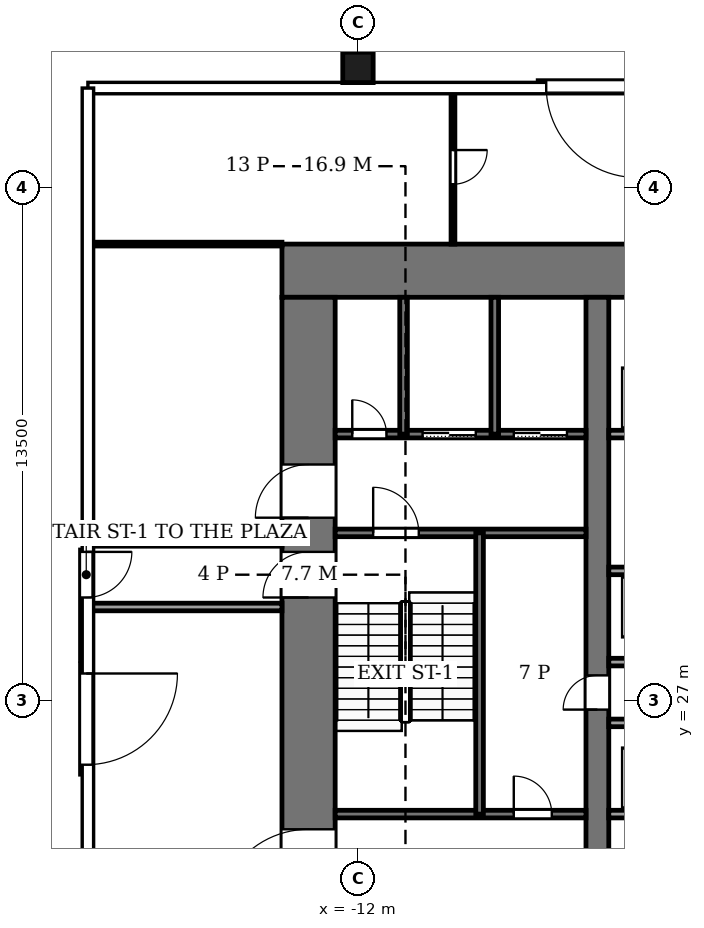
"""IFC4 building model, lengths in metres.
Left out: names, types, materials, properties, quantities, classifications, styles, units other than length and angle.
Written with IfcOpenShell. Run it as: python <this file> out.ifc"""

import sys

from ifc_helpers import new_model, si_unit, direction, frame, frame_2d, origin, origin_2d, place, context, subcontext, project, spatial, rectangle, hollow_rectangle, extrude, element, fill, save


model = new_model("IFC4")
c1 = context("Model", 3, precision=1e-05, world=origin(), true_north=direction((0.0, 1.0)))
c2 = subcontext(c1, "Body", "Model", "MODEL_VIEW")
j1 = project(units=[si_unit("LENGTHUNIT", "METRE"), si_unit("PLANEANGLEUNIT", "RADIAN")], contexts=[c1])
p1 = place(None, origin())
s1 = spatial("IfcSite", under=j1, at=p1, CompositionType="ELEMENT")
p2 = place(p1, origin())
s2 = spatial("IfcBuilding", under=s1, at=p2, CompositionType="ELEMENT")
p3 = place(p2, origin())
s3 = spatial("IfcBuildingStorey", under=s2, at=p3, CompositionType="ELEMENT", Elevation=0.0)
p4 = place(p3, frame((-14.0, 38.3, -0.45), z_axis=(0.0, 0.0, 1.0), x_axis=(1.0, 0.0, 0.0)))
e1 = element("IfcWall", 1, at=p4, inside=s3, PredefinedType="SHEAR", context=c2, shape_type="SweptSolid", body=[
    extrude(rectangle(XDim=28.0, YDim=1.4, at=frame_2d((14.0, 0.0))), origin(), (0.0, 0.0, 1.0), 9.32),
])
p5 = place(p3, frame((-13.3, 18.4, -0.45), z_axis=(0.0, 0.0, 1.0), x_axis=(0.0, 1.0, 0.0)))
e2 = element("IfcWall", 2, at=p5, inside=s3, PredefinedType="SHEAR", context=c2, shape_type="SweptSolid", body=[
    extrude(rectangle(XDim=19.2, YDim=1.4, at=frame_2d((9.6, 0.0))), origin(), (0.0, 0.0, 1.0), 9.32),
])
p6 = place(p5, frame((2.8, 0.0, 0.45)))
e3 = element("IfcOpeningElement", 3, at=p6, cuts=e2, PredefinedType="OPENING", context=c2, shape_type="SweptSolid", body=[
    extrude(rectangle(XDim=2.4, YDim=2.4, at=frame_2d((1.2, 1.2))), frame((0.0, 0.71, 0.0), z_axis=(0.0, -1.0, 0.0), x_axis=(1.0, 0.0, 0.0)), (0.0, 0.0, 1.0), 1.42),
])
p7 = place(p5, frame((13.4, 0.0, 0.45)))
e4 = element("IfcOpeningElement", 4, at=p7, cuts=e2, PredefinedType="OPENING", context=c2, shape_type="SweptSolid", body=[
    extrude(rectangle(XDim=1.4, YDim=2.2, at=frame_2d((0.7, 1.1))), frame((0.0, 0.71, 0.0), z_axis=(0.0, -1.0, 0.0), x_axis=(1.0, 0.0, 0.0)), (0.0, 0.0, 1.0), 1.42),
])
p8 = place(p5, frame((11.3, 0.0, 0.45)))
e5 = element("IfcOpeningElement", 5, at=p8, cuts=e2, PredefinedType="OPENING", context=c2, shape_type="SweptSolid", body=[
    extrude(rectangle(XDim=1.2, YDim=2.2, at=frame_2d((0.6, 1.1))), frame((0.0, 0.71, 0.0), z_axis=(0.0, -1.0, 0.0), x_axis=(1.0, 0.0, 0.0)), (0.0, 0.0, 1.0), 1.42),
])
p9 = place(p3, frame((-5.7, 18.4, -0.45), z_axis=(0.0, 0.0, 1.0), x_axis=(0.0, 1.0, 0.0)))
e6 = element("IfcWall", 6, at=p9, inside=s3, PredefinedType="SHEAR", context=c2, shape_type="SweptSolid", body=[
    extrude(rectangle(XDim=19.2, YDim=0.6, at=frame_2d((9.6, 0.0))), origin(), (0.0, 0.0, 1.0), 9.32),
])
p10 = place(p9, frame((8.35, 0.0, 0.45)))
e7 = element("IfcOpeningElement", 7, at=p10, cuts=e6, PredefinedType="OPENING", context=c2, shape_type="SweptSolid", body=[
    extrude(rectangle(XDim=0.9, YDim=2.1, at=frame_2d((0.45, 1.05))), frame((0.0, 0.31, 0.0), z_axis=(0.0, -1.0, 0.0), x_axis=(1.0, 0.0, 0.0)), (0.0, 0.0, 1.0), 0.62),
])
p11 = place(p3, frame((-12.0, 43.65, 0.0), z_axis=(0.0, 0.0, 1.0), x_axis=(1.0, 0.0, 0.0)))
e8 = element("IfcColumn", 8, at=p11, inside=s3, PredefinedType="COLUMN", context=c2, shape_type="SweptSolid", body=[
    extrude(hollow_rectangle(XDim=0.8, YDim=0.8, WallThickness=0.04, at=origin_2d()), origin(), (0.0, 0.0, 1.0), 9.0),
])
p12 = place(p3, frame((-4.435, 43.15, 0.0), z_axis=(0.0, 0.0, 1.0), x_axis=(-1.0, 0.0, 0.0)))
e9 = element("IfcWall", 9, at=p12, inside=s3, PredefinedType="SOLIDWALL", context=c2, shape_type="SweptSolid", body=[
    extrude(rectangle(XDim=2.823, YDim=0.3, at=frame_2d((1.412, 0.0))), origin(), (0.0, 0.0, 1.0), 3.11),
])
p13 = place(p12, frame((0.211, 0.0, 0.0)))
e10 = element("IfcOpeningElement", 10, at=p13, cuts=e9, PredefinedType="OPENING", context=c2, shape_type="SweptSolid", body=[
    extrude(rectangle(XDim=2.4, YDim=2.7, at=frame_2d((1.2, 1.35))), frame((0.0, 0.16, 0.0), z_axis=(0.0, -1.0, 0.0), x_axis=(1.0, 0.0, 0.0)), (0.0, 0.0, 1.0), 0.32),
])
p14 = place(p3, frame((-19.15, 27.95, 0.0), z_axis=(0.0, 0.0, 1.0), x_axis=(0.0, -1.0, 0.0)))
e11 = element("IfcWall", 11, at=p14, inside=s3, PredefinedType="SOLIDWALL", context=c2, shape_type="SweptSolid", body=[
    extrude(rectangle(XDim=2.9, YDim=0.3, at=frame_2d((1.45, 0.0))), origin(), (0.0, 0.0, 1.0), 3.11),
])
p15 = place(p14, frame((0.25, 0.0, 0.0)))
e12 = element("IfcOpeningElement", 12, at=p15, cuts=e11, PredefinedType="OPENING", context=c2, shape_type="SweptSolid", body=[
    extrude(rectangle(XDim=2.4, YDim=2.7, at=frame_2d((1.2, 1.35))), frame((0.0, 0.16, 0.0), z_axis=(0.0, -1.0, 0.0), x_axis=(1.0, 0.0, 0.0)), (0.0, 0.0, 1.0), 0.32),
])
p16 = place(p3, frame((-19.15, 30.95, 0.0), z_axis=(0.0, 0.0, 1.0), x_axis=(0.0, -1.0, 0.0)))
e13 = element("IfcWall", 13, at=p16, inside=s3, PredefinedType="SOLIDWALL", context=c2, shape_type="SweptSolid", body=[
    extrude(rectangle(XDim=2.9, YDim=0.3, at=frame_2d((1.45, 0.0))), origin(), (0.0, 0.0, 1.0), 3.11),
])
p17 = place(p16, frame((0.05, 0.0, 0.0)))
e14 = element("IfcOpeningElement", 14, at=p17, cuts=e13, PredefinedType="OPENING", context=c2, shape_type="SweptSolid", body=[
    extrude(rectangle(XDim=1.2, YDim=2.2, at=frame_2d((0.6, 1.1))), frame((0.0, 0.16, 0.0), z_axis=(0.0, -1.0, 0.0), x_axis=(1.0, 0.0, 0.0)), (0.0, 0.0, 1.0), 0.32),
])
p18 = place(p3, frame((-12.6, 24.0, 0.0), z_axis=(0.0, 0.0, 1.0), x_axis=(1.0, 0.0, 0.0)))
e15 = element("IfcWall", 15, at=p18, inside=s3, PredefinedType="PARTITIONING", context=c2, shape_type="SweptSolid", body=[
    extrude(rectangle(XDim=6.6, YDim=0.2, at=frame_2d((3.3, 0.0))), origin(), (0.0, 0.0, 1.0), 8.87),
])
p19 = place(p18, frame((4.7, 0.0, 0.0)))
e16 = element("IfcOpeningElement", 16, at=p19, cuts=e15, PredefinedType="OPENING", context=c2, shape_type="SweptSolid", body=[
    extrude(rectangle(XDim=1.0, YDim=2.1, at=frame_2d((0.5, 1.05))), frame((0.0, 0.11, 0.0), z_axis=(0.0, -1.0, 0.0), x_axis=(1.0, 0.0, 0.0)), (0.0, 0.0, 1.0), 0.22),
])
p20 = place(p3, frame((-5.4, 24.0, 0.0), z_axis=(0.0, 0.0, 1.0), x_axis=(1.0, 0.0, 0.0)))
e17 = element("IfcWall", 17, at=p20, inside=s3, PredefinedType="PARTITIONING", context=c2, shape_type="SweptSolid", body=[
    extrude(rectangle(XDim=10.8, YDim=0.2, at=frame_2d((5.4, 0.0))), origin(), (0.0, 0.0, 1.0), 8.87),
])
p21 = place(p20, frame((0.75, 0.0, 0.0)))
e18 = element("IfcOpeningElement", 18, at=p21, cuts=e17, PredefinedType="OPENING", context=c2, shape_type="SweptSolid", body=[
    extrude(rectangle(XDim=1.2, YDim=2.2, at=frame_2d((0.6, 1.1))), frame((0.0, 0.11, 0.0), z_axis=(0.0, -1.0, 0.0), x_axis=(1.0, 0.0, 0.0)), (0.0, 0.0, 1.0), 0.22),
])
p22 = place(p20, frame((3.45, 0.0, 0.0)))
e19 = element("IfcOpeningElement", 19, at=p22, cuts=e17, PredefinedType="OPENING", context=c2, shape_type="SweptSolid", body=[
    extrude(rectangle(XDim=1.2, YDim=2.2, at=frame_2d((0.6, 1.1))), frame((0.0, 0.11, 0.0), z_axis=(0.0, -1.0, 0.0), x_axis=(1.0, 0.0, 0.0)), (0.0, 0.0, 1.0), 0.22),
])
p23 = place(p20, frame((6.15, 0.0, 0.0)))
e20 = element("IfcOpeningElement", 20, at=p23, cuts=e17, PredefinedType="OPENING", context=c2, shape_type="SweptSolid", body=[
    extrude(rectangle(XDim=1.2, YDim=2.2, at=frame_2d((0.6, 1.1))), frame((0.0, 0.11, 0.0), z_axis=(0.0, -1.0, 0.0), x_axis=(1.0, 0.0, 0.0)), (0.0, 0.0, 1.0), 0.22),
])
p24 = place(p20, frame((8.85, 0.0, 0.0)))
e21 = element("IfcOpeningElement", 21, at=p24, cuts=e17, PredefinedType="OPENING", context=c2, shape_type="SweptSolid", body=[
    extrude(rectangle(XDim=1.2, YDim=2.2, at=frame_2d((0.6, 1.1))), frame((0.0, 0.11, 0.0), z_axis=(0.0, -1.0, 0.0), x_axis=(1.0, 0.0, 0.0)), (0.0, 0.0, 1.0), 0.22),
])
for number, where, z_axis, x_axis in (
    (22, (-5.4, 26.4, 0.0), (0.0, 0.0, 1.0), (1.0, 0.0, 0.0)),
    (23, (-5.4, 28.0, 0.0), (0.0, 0.0, 1.0), (1.0, 0.0, 0.0)),
):
    element("IfcWall", number, at=place(p3, frame(where, z_axis=z_axis, x_axis=x_axis)), inside=s3, PredefinedType="PARTITIONING", context=c2, shape_type="SweptSolid", body=[
        extrude(rectangle(XDim=10.8, YDim=0.2, at=frame_2d((5.4, 0.0))), origin(), (0.0, 0.0, 1.0), 8.87),
    ])
p25 = place(p3, frame((-5.4, 30.4, 0.0), z_axis=(0.0, 0.0, 1.0), x_axis=(1.0, 0.0, 0.0)))
e24 = element("IfcWall", 24, at=p25, inside=s3, PredefinedType="PARTITIONING", context=c2, shape_type="SweptSolid", body=[
    extrude(rectangle(XDim=10.8, YDim=0.2, at=frame_2d((5.4, 0.0))), origin(), (0.0, 0.0, 1.0), 8.87),
])
p26 = place(p25, frame((0.75, 0.0, 0.0)))
e25 = element("IfcOpeningElement", 25, at=p26, cuts=e24, PredefinedType="OPENING", context=c2, shape_type="SweptSolid", body=[
    extrude(rectangle(XDim=1.2, YDim=2.2, at=frame_2d((0.6, 1.1))), frame((0.0, 0.11, 0.0), z_axis=(0.0, -1.0, 0.0), x_axis=(1.0, 0.0, 0.0)), (0.0, 0.0, 1.0), 0.22),
])
p27 = place(p25, frame((3.45, 0.0, 0.0)))
e26 = element("IfcOpeningElement", 26, at=p27, cuts=e24, PredefinedType="OPENING", context=c2, shape_type="SweptSolid", body=[
    extrude(rectangle(XDim=1.2, YDim=2.2, at=frame_2d((0.6, 1.1))), frame((0.0, 0.11, 0.0), z_axis=(0.0, -1.0, 0.0), x_axis=(1.0, 0.0, 0.0)), (0.0, 0.0, 1.0), 0.22),
])
p28 = place(p25, frame((6.15, 0.0, 0.0)))
e27 = element("IfcOpeningElement", 27, at=p28, cuts=e24, PredefinedType="OPENING", context=c2, shape_type="SweptSolid", body=[
    extrude(rectangle(XDim=1.2, YDim=2.2, at=frame_2d((0.6, 1.1))), frame((0.0, 0.11, 0.0), z_axis=(0.0, -1.0, 0.0), x_axis=(1.0, 0.0, 0.0)), (0.0, 0.0, 1.0), 0.22),
])
p29 = place(p25, frame((8.85, 0.0, 0.0)))
e28 = element("IfcOpeningElement", 28, at=p29, cuts=e24, PredefinedType="OPENING", context=c2, shape_type="SweptSolid", body=[
    extrude(rectangle(XDim=1.2, YDim=2.2, at=frame_2d((0.6, 1.1))), frame((0.0, 0.11, 0.0), z_axis=(0.0, -1.0, 0.0), x_axis=(1.0, 0.0, 0.0)), (0.0, 0.0, 1.0), 0.22),
])
p30 = place(p3, frame((-12.6, 31.4, 0.0), z_axis=(0.0, 0.0, 1.0), x_axis=(1.0, 0.0, 0.0)))
e29 = element("IfcWall", 29, at=p30, inside=s3, PredefinedType="PARTITIONING", context=c2, shape_type="SweptSolid", body=[
    extrude(rectangle(XDim=6.6, YDim=0.2, at=frame_2d((3.3, 0.0))), origin(), (0.0, 0.0, 1.0), 8.87),
])
p31 = place(p30, frame((1.0, 0.0, 0.0)))
e30 = element("IfcOpeningElement", 30, at=p31, cuts=e29, PredefinedType="OPENING", context=c2, shape_type="SweptSolid", body=[
    extrude(rectangle(XDim=1.2, YDim=2.2, at=frame_2d((0.6, 1.1))), frame((0.0, 0.11, 0.0), z_axis=(0.0, -1.0, 0.0), x_axis=(1.0, 0.0, 0.0)), (0.0, 0.0, 1.0), 0.22),
])
p32 = place(p3, frame((-12.6, 34.0, 0.0), z_axis=(0.0, 0.0, 1.0), x_axis=(1.0, 0.0, 0.0)))
e31 = element("IfcWall", 31, at=p32, inside=s3, PredefinedType="PARTITIONING", context=c2, shape_type="SweptSolid", body=[
    extrude(rectangle(XDim=6.6, YDim=0.2, at=frame_2d((3.3, 0.0))), origin(), (0.0, 0.0, 1.0), 8.87),
])
p33 = place(p32, frame((4.7, 0.0, 0.0)))
e32 = element("IfcOpeningElement", 32, at=p33, cuts=e31, PredefinedType="OPENING", context=c2, shape_type="SweptSolid", body=[
    extrude(rectangle(XDim=1.4, YDim=2.2, at=frame_2d((0.7, 1.1))), frame((0.0, 0.11, 0.0), z_axis=(0.0, -1.0, 0.0), x_axis=(1.0, 0.0, 0.0)), (0.0, 0.0, 1.0), 0.22),
])
p34 = place(p32, frame((2.3, 0.0, 0.0)))
e33 = element("IfcOpeningElement", 33, at=p34, cuts=e31, PredefinedType="OPENING", context=c2, shape_type="SweptSolid", body=[
    extrude(rectangle(XDim=1.4, YDim=2.2, at=frame_2d((0.7, 1.1))), frame((0.0, 0.11, 0.0), z_axis=(0.0, -1.0, 0.0), x_axis=(1.0, 0.0, 0.0)), (0.0, 0.0, 1.0), 0.22),
])
p35 = place(p32, frame((0.45, 0.0, 0.0)))
e34 = element("IfcOpeningElement", 34, at=p35, cuts=e31, PredefinedType="OPENING", context=c2, shape_type="SweptSolid", body=[
    extrude(rectangle(XDim=0.9, YDim=2.1, at=frame_2d((0.45, 1.05))), frame((0.0, 0.11, 0.0), z_axis=(0.0, -1.0, 0.0), x_axis=(1.0, 0.0, 0.0)), (0.0, 0.0, 1.0), 0.22),
])
p36 = place(p3, frame((-5.4, 34.0, 0.0), z_axis=(0.0, 0.0, 1.0), x_axis=(1.0, 0.0, 0.0)))
e35 = element("IfcWall", 35, at=p36, inside=s3, PredefinedType="PARTITIONING", context=c2, shape_type="SweptSolid", body=[
    extrude(rectangle(XDim=10.8, YDim=0.2, at=frame_2d((5.4, 0.0))), origin(), (0.0, 0.0, 1.0), 8.87),
])
p37 = place(p36, frame((0.75, 0.0, 0.0)))
e36 = element("IfcOpeningElement", 36, at=p37, cuts=e35, PredefinedType="OPENING", context=c2, shape_type="SweptSolid", body=[
    extrude(rectangle(XDim=1.2, YDim=2.2, at=frame_2d((0.6, 1.1))), frame((0.0, 0.11, 0.0), z_axis=(0.0, -1.0, 0.0), x_axis=(1.0, 0.0, 0.0)), (0.0, 0.0, 1.0), 0.22),
])
p38 = place(p36, frame((3.45, 0.0, 0.0)))
e37 = element("IfcOpeningElement", 37, at=p38, cuts=e35, PredefinedType="OPENING", context=c2, shape_type="SweptSolid", body=[
    extrude(rectangle(XDim=1.2, YDim=2.2, at=frame_2d((0.6, 1.1))), frame((0.0, 0.11, 0.0), z_axis=(0.0, -1.0, 0.0), x_axis=(1.0, 0.0, 0.0)), (0.0, 0.0, 1.0), 0.22),
])
p39 = place(p36, frame((6.15, 0.0, 0.0)))
e38 = element("IfcOpeningElement", 38, at=p39, cuts=e35, PredefinedType="OPENING", context=c2, shape_type="SweptSolid", body=[
    extrude(rectangle(XDim=1.2, YDim=2.2, at=frame_2d((0.6, 1.1))), frame((0.0, 0.11, 0.0), z_axis=(0.0, -1.0, 0.0), x_axis=(1.0, 0.0, 0.0)), (0.0, 0.0, 1.0), 0.22),
])
p40 = place(p36, frame((8.95, 0.0, 0.0)))
e39 = element("IfcOpeningElement", 39, at=p40, cuts=e35, PredefinedType="OPENING", context=c2, shape_type="SweptSolid", body=[
    extrude(rectangle(XDim=1.0, YDim=2.1, at=frame_2d((0.5, 1.05))), frame((0.0, 0.11, 0.0), z_axis=(0.0, -1.0, 0.0), x_axis=(1.0, 0.0, 0.0)), (0.0, 0.0, 1.0), 0.22),
])
p41 = place(p3, frame((-10.8, 34.0, 0.0), z_axis=(0.0, 0.0, 1.0), x_axis=(0.0, 1.0, 0.0)))
e40 = element("IfcWall", 40, at=p41, inside=s3, PredefinedType="PARTITIONING", context=c2, shape_type="SweptSolid", body=[
    extrude(rectangle(XDim=3.6, YDim=0.2, at=frame_2d((1.8, 0.0))), origin(), (0.0, 0.0, 1.0), 8.87),
])
p42 = place(p3, frame((-8.8, 24.0, 0.0), z_axis=(0.0, 0.0, 1.0), x_axis=(0.0, 1.0, 0.0)))
e41 = element("IfcWall", 41, at=p42, inside=s3, PredefinedType="PARTITIONING", context=c2, shape_type="SweptSolid", body=[
    extrude(rectangle(XDim=7.4, YDim=0.2, at=frame_2d((3.7, 0.0))), origin(), (0.0, 0.0, 1.0), 8.87),
])
p43 = place(p3, frame((-8.4, 34.0, 0.0), z_axis=(0.0, 0.0, 1.0), x_axis=(0.0, 1.0, 0.0)))
e42 = element("IfcWall", 42, at=p43, inside=s3, PredefinedType="PARTITIONING", context=c2, shape_type="SweptSolid", body=[
    extrude(rectangle(XDim=3.6, YDim=0.2, at=frame_2d((1.8, 0.0))), origin(), (0.0, 0.0, 1.0), 8.87),
])
for number, where, z_axis, x_axis in (
    (43, (-14.0, 29.45, 0.0), (0.0, 0.0, 1.0), (-1.0, 0.0, 0.0)),
    (44, (-14.0, 31.15, 0.0), (0.0, 0.0, 1.0), (-1.0, 0.0, 0.0)),
):
    element("IfcWall", number, at=place(p3, frame(where, z_axis=z_axis, x_axis=x_axis)), inside=s3, PredefinedType="PARTITIONING", context=c2, shape_type="SweptSolid", body=[
        extrude(rectangle(XDim=5.0, YDim=0.2, at=frame_2d((2.5, 0.0))), origin(), (0.0, 0.0, 1.0), 8.75),
    ])
p44 = place(p3, frame((-14.0, 39.0, 0.0), z_axis=(0.0, 0.0, 1.0), x_axis=(-1.0, 0.0, 0.0)))
e45 = element("IfcWall", 45, at=p44, inside=s3, PredefinedType="PARTITIONING", context=c2, shape_type="SweptSolid", body=[
    extrude(rectangle(XDim=5.05, YDim=0.1, at=frame_2d((2.525, 0.0))), origin(), (0.0, 0.0, 1.0), 8.14),
])
p45 = place(p3, frame((-9.5, 43.05, 0.0), z_axis=(0.0, 0.0, 1.0), x_axis=(0.0, -1.0, 0.0)))
e46 = element("IfcWall", 46, at=p45, inside=s3, PredefinedType="PARTITIONING", context=c2, shape_type="SweptSolid", body=[
    extrude(rectangle(XDim=4.05, YDim=0.1, at=frame_2d((2.025, 0.0))), origin(), (0.0, 0.0, 1.0), 8.87),
])
p46 = place(p45, frame((1.575, 0.0, 0.0)))
e47 = element("IfcOpeningElement", 47, at=p46, cuts=e46, PredefinedType="OPENING", context=c2, shape_type="SweptSolid", body=[
    extrude(rectangle(XDim=0.9, YDim=2.1, at=frame_2d((0.45, 1.05))), frame((0.0, 0.06, 0.0), z_axis=(0.0, -1.0, 0.0), x_axis=(1.0, 0.0, 0.0)), (0.0, 0.0, 1.0), 0.12),
])
p47 = place(p13, origin())
e48 = element("IfcDoor", 48, at=p47, inside=s3, OperationType="DOUBLE_DOOR_SINGLE_SWING", PredefinedType="DOOR", context=c2, shape_type="SweptSolid", body=[
    extrude(rectangle(XDim=2.4, YDim=2.7, at=frame_2d((1.2, 1.35))), frame((0.0, 0.025, 0.0), z_axis=(0.0, -1.0, 0.0), x_axis=(1.0, 0.0, 0.0)), (0.0, 0.0, 1.0), 0.05),
])
fill(e10, e48)
p48 = place(p15, origin())
e49 = element("IfcDoor", 49, at=p48, inside=s3, OperationType="DOUBLE_DOOR_SINGLE_SWING", PredefinedType="DOOR", context=c2, shape_type="SweptSolid", body=[
    extrude(rectangle(XDim=2.4, YDim=2.7, at=frame_2d((1.2, 1.35))), frame((0.0, 0.025, 0.0), z_axis=(0.0, -1.0, 0.0), x_axis=(1.0, 0.0, 0.0)), (0.0, 0.0, 1.0), 0.05),
])
fill(e12, e49)
p49 = place(p17, origin())
e50 = element("IfcDoor", 50, at=p49, inside=s3, OperationType="SINGLE_SWING_LEFT", PredefinedType="DOOR", context=c2, shape_type="SweptSolid", body=[
    extrude(rectangle(XDim=1.2, YDim=2.2, at=frame_2d((0.6, 1.1))), frame((0.0, 0.025, 0.0), z_axis=(0.0, -1.0, 0.0), x_axis=(1.0, 0.0, 0.0)), (0.0, 0.0, 1.0), 0.05),
])
fill(e14, e50)
p50 = place(p33, origin())
e51 = element("IfcDoor", 51, at=p50, inside=s3, OperationType="SLIDING_TO_LEFT", PredefinedType="DOOR", context=c2, shape_type="SweptSolid", body=[
    extrude(rectangle(XDim=1.4, YDim=2.2, at=frame_2d((0.7, 1.1))), frame((0.0, 0.025, 0.0), z_axis=(0.0, -1.0, 0.0), x_axis=(1.0, 0.0, 0.0)), (0.0, 0.0, 1.0), 0.05),
])
fill(e32, e51)
p51 = place(p34, origin())
e52 = element("IfcDoor", 52, at=p51, inside=s3, OperationType="SLIDING_TO_LEFT", PredefinedType="DOOR", context=c2, shape_type="SweptSolid", body=[
    extrude(rectangle(XDim=1.4, YDim=2.2, at=frame_2d((0.7, 1.1))), frame((0.0, 0.025, 0.0), z_axis=(0.0, -1.0, 0.0), x_axis=(1.0, 0.0, 0.0)), (0.0, 0.0, 1.0), 0.05),
])
fill(e33, e52)
p52 = place(p35, origin())
e53 = element("IfcDoor", 53, at=p52, inside=s3, OperationType="SINGLE_SWING_RIGHT", PredefinedType="DOOR", context=c2, shape_type="SweptSolid", body=[
    extrude(rectangle(XDim=0.9, YDim=2.1, at=frame_2d((0.45, 1.05))), frame((0.0, 0.025, 0.0), z_axis=(0.0, -1.0, 0.0), x_axis=(1.0, 0.0, 0.0)), (0.0, 0.0, 1.0), 0.05),
])
fill(e34, e53)
p53 = place(p19, origin())
e54 = element("IfcDoor", 54, at=p53, inside=s3, OperationType="SINGLE_SWING_RIGHT", PredefinedType="DOOR", context=c2, shape_type="SweptSolid", body=[
    extrude(rectangle(XDim=1.0, YDim=2.1, at=frame_2d((0.5, 1.05))), frame((0.0, 0.025, 0.0), z_axis=(0.0, -1.0, 0.0), x_axis=(1.0, 0.0, 0.0)), (0.0, 0.0, 1.0), 0.05),
])
fill(e16, e54)
p54 = place(p10, origin())
e55 = element("IfcDoor", 55, at=p54, inside=s3, OperationType="SINGLE_SWING_RIGHT", PredefinedType="DOOR", context=c2, shape_type="SweptSolid", body=[
    extrude(rectangle(XDim=0.9, YDim=2.1, at=frame_2d((0.45, 1.05))), frame((0.0, 0.025, 0.0), z_axis=(0.0, -1.0, 0.0), x_axis=(1.0, 0.0, 0.0)), (0.0, 0.0, 1.0), 0.05),
])
fill(e7, e55)
p55 = place(p31, origin())
e56 = element("IfcDoor", 56, at=p55, inside=s3, OperationType="SINGLE_SWING_RIGHT", PredefinedType="DOOR", context=c2, shape_type="SweptSolid", body=[
    extrude(rectangle(XDim=1.2, YDim=2.2, at=frame_2d((0.6, 1.1))), frame((0.0, 0.025, 0.0), z_axis=(0.0, -1.0, 0.0), x_axis=(1.0, 0.0, 0.0)), (0.0, 0.0, 1.0), 0.05),
])
fill(e30, e56)
p56 = place(p6, origin())
e57 = element("IfcDoor", 57, at=p56, inside=s3, OperationType="DOUBLE_DOOR_SINGLE_SWING", PredefinedType="DOOR", context=c2, shape_type="SweptSolid", body=[
    extrude(rectangle(XDim=2.4, YDim=2.4, at=frame_2d((1.2, 1.2))), frame((0.0, 0.025, 0.0), z_axis=(0.0, -1.0, 0.0), x_axis=(1.0, 0.0, 0.0)), (0.0, 0.0, 1.0), 0.05),
])
fill(e3, e57)
p57 = place(p7, origin())
e58 = element("IfcDoor", 58, at=p57, inside=s3, OperationType="SINGLE_SWING_RIGHT", PredefinedType="DOOR", context=c2, shape_type="SweptSolid", body=[
    extrude(rectangle(XDim=1.4, YDim=2.2, at=frame_2d((0.7, 1.1))), frame((0.0, 0.025, 0.0), z_axis=(0.0, -1.0, 0.0), x_axis=(1.0, 0.0, 0.0)), (0.0, 0.0, 1.0), 0.05),
])
fill(e4, e58)
p58 = place(p8, origin())
e59 = element("IfcDoor", 59, at=p58, inside=s3, OperationType="SINGLE_SWING_LEFT", PredefinedType="DOOR", context=c2, shape_type="SweptSolid", body=[
    extrude(rectangle(XDim=1.2, YDim=2.2, at=frame_2d((0.6, 1.1))), frame((0.0, -0.65, 0.0), z_axis=(0.0, -1.0, 0.0), x_axis=(1.0, 0.0, 0.0)), (0.0, 0.0, 1.0), 0.05),
])
fill(e5, e59)
p59 = place(p46, origin())
e60 = element("IfcDoor", 60, at=p59, inside=s3, OperationType="SINGLE_SWING_LEFT", PredefinedType="DOOR", context=c2, shape_type="SweptSolid", body=[
    extrude(rectangle(XDim=0.9, YDim=2.1, at=frame_2d((0.45, 1.05))), frame((0.0, 0.025, 0.0), z_axis=(0.0, -1.0, 0.0), x_axis=(1.0, 0.0, 0.0)), (0.0, 0.0, 1.0), 0.05),
])
fill(e47, e60)
save(model, sys.argv[1])
